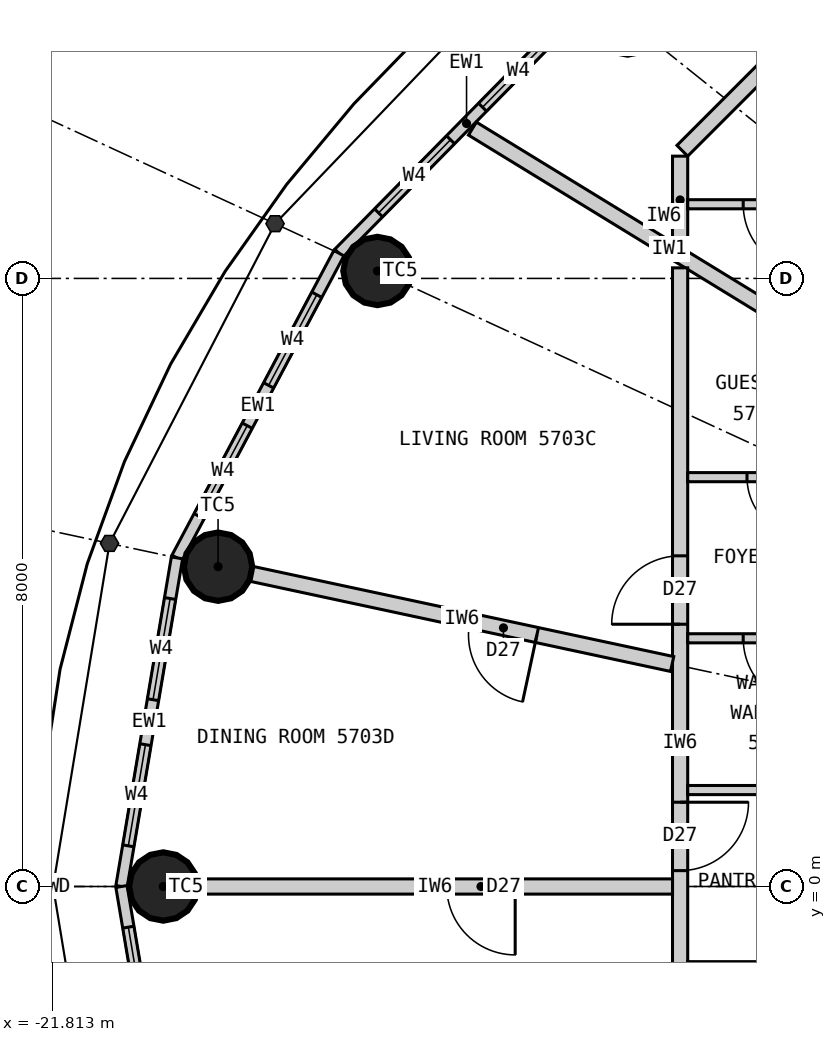
"""IFC4 building model, lengths in metres.
Left out: names, types, materials, properties, quantities, classifications, styles, units other than length and angle.
Written with IfcOpenShell. Run it as: python <this file> out.ifc"""

import sys

from ifc_helpers import new_model, si_unit, direction, frame, frame_2d, origin, origin_2d, place, context, subcontext, project, spatial, rectangle, circle, extrude, element, fill, save


model = new_model("IFC4")
c1 = context("Model", 3, precision=1e-05, world=origin(), true_north=direction((0.0, 1.0)))
c2 = subcontext(c1, "Body", "Model", "MODEL_VIEW")
j1 = project(units=[si_unit("LENGTHUNIT", "METRE"), si_unit("PLANEANGLEUNIT", "RADIAN")], contexts=[c1])
p1 = place(None, origin())
s1 = spatial("IfcSite", under=j1, at=p1, CompositionType="ELEMENT")
p2 = place(p1, origin())
s2 = spatial("IfcBuilding", under=s1, at=p2, CompositionType="ELEMENT")
p3 = place(p2, frame((0.0, 0.0, 212.7)))
s3 = spatial("IfcBuildingStorey", under=s2, at=p3, CompositionType="ELEMENT", Elevation=212.7)
for number, where, z_axis, x_axis in (
    (1, (-14.241, 11.393, 0.0), (0.0, 0.0, 1.0), (1.0, 0.0, 0.0)),
    (2, (-17.532, 8.098, 0.0), (0.0, 0.0, 1.0), (1.0, 0.0, 0.0)),
    (3, (-19.629, 4.208, 0.0), (0.0, 0.0, 1.0), (1.0, 0.0, 0.0)),
    (4, (-20.35, 0.0, 0.0), (0.0, 0.0, 1.0), (1.0, 0.0, 0.0)),
):
    element("IfcColumn", number, at=place(p3, frame(where, z_axis=z_axis, x_axis=x_axis)), inside=s3, PredefinedType="COLUMN", context=c2, shape_type="SweptSolid", body=[
        extrude(circle(Radius=0.45, at=origin_2d()), origin(), (0.0, 0.0, 1.0), 3.3),
    ])
p4 = place(p3, frame((-14.68, 11.744, 0.0), z_axis=(0.0, 0.0, 1.0), x_axis=(-0.701527379618, -0.712642501993, 0.0)))
e5 = element("IfcWall", 5, at=p4, inside=s3, PredefinedType="ELEMENTEDWALL", context=c2, shape_type="SweptSolid", body=[
    extrude(rectangle(XDim=4.788, YDim=0.15, at=frame_2d((2.394, 0.0))), origin(), (0.0, 0.0, 1.0), 3.12),
])
p5 = place(p4, frame((0.744, 0.0, 0.9)))
e6 = element("IfcOpeningElement", 6, at=p5, cuts=e5, PredefinedType="OPENING", context=c2, shape_type="SweptSolid", body=[
    extrude(rectangle(XDim=1.35, YDim=1.9, at=frame_2d((0.675, 0.95))), frame((0.0, 0.085, 0.0), z_axis=(0.0, -1.0, 0.0), x_axis=(1.0, 0.0, 0.0)), (0.0, 0.0, 1.0), 0.17),
])
p6 = place(p4, frame((2.694, 0.0, 0.9)))
e7 = element("IfcOpeningElement", 7, at=p6, cuts=e5, PredefinedType="OPENING", context=c2, shape_type="SweptSolid", body=[
    extrude(rectangle(XDim=1.35, YDim=1.9, at=frame_2d((0.675, 0.95))), frame((0.0, 0.085, 0.0), z_axis=(0.0, -1.0, 0.0), x_axis=(1.0, 0.0, 0.0)), (0.0, 0.0, 1.0), 0.17),
])
p7 = place(p3, frame((-18.04, 8.332, 0.0), z_axis=(0.0, 0.0, 1.0), x_axis=(-0.469256152955, -0.883062094597, 0.0)))
e8 = element("IfcWall", 8, at=p7, inside=s3, PredefinedType="ELEMENTEDWALL", context=c2, shape_type="SweptSolid", body=[
    extrude(rectangle(XDim=4.539, YDim=0.15, at=frame_2d((2.27, 0.0))), origin(), (0.0, 0.0, 1.0), 3.12),
])
p8 = place(p7, frame((0.62, 0.0, 0.9)))
e9 = element("IfcOpeningElement", 9, at=p8, cuts=e8, PredefinedType="OPENING", context=c2, shape_type="SweptSolid", body=[
    extrude(rectangle(XDim=1.35, YDim=1.9, at=frame_2d((0.675, 0.95))), frame((0.0, 0.085, 0.0), z_axis=(0.0, -1.0, 0.0), x_axis=(1.0, 0.0, 0.0)), (0.0, 0.0, 1.0), 0.17),
])
p9 = place(p7, frame((2.57, 0.0, 0.9)))
e10 = element("IfcOpeningElement", 10, at=p9, cuts=e8, PredefinedType="OPENING", context=c2, shape_type="SweptSolid", body=[
    extrude(rectangle(XDim=1.35, YDim=1.9, at=frame_2d((0.675, 0.95))), frame((0.0, 0.085, 0.0), z_axis=(0.0, -1.0, 0.0), x_axis=(1.0, 0.0, 0.0)), (0.0, 0.0, 1.0), 0.17),
])
p10 = place(p3, frame((-20.17, 4.323, 0.0), z_axis=(0.0, 0.0, 1.0), x_axis=(-0.166538513568, -0.986034950445, 0.0)))
e11 = element("IfcWall", 11, at=p10, inside=s3, PredefinedType="ELEMENTEDWALL", context=c2, shape_type="SweptSolid", body=[
    extrude(rectangle(XDim=4.385, YDim=0.15, at=frame_2d((2.192, 0.0))), origin(), (0.0, 0.0, 1.0), 3.12),
])
p11 = place(p10, frame((0.542, 0.0, 0.9)))
e12 = element("IfcOpeningElement", 12, at=p11, cuts=e11, PredefinedType="OPENING", context=c2, shape_type="SweptSolid", body=[
    extrude(rectangle(XDim=1.35, YDim=1.9, at=frame_2d((0.675, 0.95))), frame((0.0, 0.085, 0.0), z_axis=(0.0, -1.0, 0.0), x_axis=(1.0, 0.0, 0.0)), (0.0, 0.0, 1.0), 0.17),
])
p12 = place(p10, frame((2.492, 0.0, 0.9)))
e13 = element("IfcOpeningElement", 13, at=p12, cuts=e11, PredefinedType="OPENING", context=c2, shape_type="SweptSolid", body=[
    extrude(rectangle(XDim=1.35, YDim=1.9, at=frame_2d((0.675, 0.95))), frame((0.0, 0.085, 0.0), z_axis=(0.0, -1.0, 0.0), x_axis=(1.0, 0.0, 0.0)), (0.0, 0.0, 1.0), 0.17),
])
p13 = place(p3, frame((-20.9, 0.0, 0.0), z_axis=(0.0, 0.0, 1.0), x_axis=(0.166538513568, -0.986034950445, 0.0)))
e14 = element("IfcWall", 14, at=p13, inside=s3, PredefinedType="ELEMENTEDWALL", context=c2, shape_type="SweptSolid", body=[
    extrude(rectangle(XDim=4.385, YDim=0.15, at=frame_2d((2.192, 0.0))), origin(), (0.0, 0.0, 1.0), 3.12),
])
p14 = place(p13, frame((0.542, 0.0, 0.9)))
e15 = element("IfcOpeningElement", 15, at=p14, cuts=e14, PredefinedType="OPENING", context=c2, shape_type="SweptSolid", body=[
    extrude(rectangle(XDim=1.35, YDim=1.9, at=frame_2d((0.675, 0.95))), frame((0.0, 0.085, 0.0), z_axis=(0.0, -1.0, 0.0), x_axis=(1.0, 0.0, 0.0)), (0.0, 0.0, 1.0), 0.17),
])
p15 = place(p13, frame((2.492, 0.0, 0.9)))
e16 = element("IfcOpeningElement", 16, at=p15, cuts=e14, PredefinedType="OPENING", context=c2, shape_type="SweptSolid", body=[
    extrude(rectangle(XDim=1.35, YDim=1.9, at=frame_2d((0.675, 0.95))), frame((0.0, 0.085, 0.0), z_axis=(0.0, -1.0, 0.0), x_axis=(1.0, 0.0, 0.0)), (0.0, 0.0, 1.0), 0.17),
])
p16 = place(p3, frame((-11.1, 6.797, 0.0), z_axis=(0.0, 0.0, 1.0), x_axis=(-0.852799818179, 0.522237943963, 0.0)))
e17 = element("IfcWall", 17, at=p16, inside=s3, PredefinedType="PARTITIONING", context=c2, shape_type="SweptSolid", body=[
    extrude(rectangle(XDim=6.077, YDim=0.2, at=frame_2d((3.039, 0.0))), origin(), (0.0, 0.0, 1.0), 3.12),
])
p17 = place(p3, frame((-10.679, 12.521, 0.0), z_axis=(0.0, 0.0, 1.0), x_axis=(-0.707106781187, -0.707106781187, 0.0)))
e18 = element("IfcWall", 18, at=p17, inside=s3, PredefinedType="PARTITIONING", context=c2, shape_type="SweptSolid", body=[
    extrude(rectangle(XDim=4.019, YDim=0.2, at=frame_2d((2.009, 0.0))), origin(), (0.0, 0.0, 1.0), 3.12),
])
p18 = place(p3, frame((-13.55, 9.609, 0.0), z_axis=(0.0, 0.0, 1.0), x_axis=(0.0, -1.0, 0.0)))
e19 = element("IfcWall", 19, at=p18, inside=s3, PredefinedType="PARTITIONING", context=c2, shape_type="SweptSolid", body=[
    extrude(rectangle(XDim=1.153, YDim=0.2, at=frame_2d((0.576, 0.0))), origin(), (0.0, 0.0, 1.0), 3.12),
])
p19 = place(p3, frame((-11.1, 8.976, 0.0), z_axis=(0.0, 0.0, 1.0), x_axis=(-1.0, 0.0, 0.0)))
e20 = element("IfcWall", 20, at=p19, inside=s3, PredefinedType="PARTITIONING", context=c2, shape_type="SweptSolid", body=[
    extrude(rectangle(XDim=2.35, YDim=0.12, at=frame_2d((1.175, 0.0))), origin(), (0.0, 0.0, 1.0), 3.12),
])
p20 = place(p19, frame((0.72, 0.0, 0.0)))
e21 = element("IfcOpeningElement", 21, at=p20, cuts=e20, PredefinedType="OPENING", context=c2, shape_type="SweptSolid", body=[
    extrude(rectangle(XDim=0.9, YDim=2.1, at=frame_2d((0.45, 1.05))), frame((0.0, 0.07, 0.0), z_axis=(0.0, -1.0, 0.0), x_axis=(1.0, 0.0, 0.0)), (0.0, 0.0, 1.0), 0.14),
])
p21 = place(p3, frame((-13.55, 8.139, 0.0), z_axis=(0.0, 0.0, 1.0), x_axis=(0.0, -1.0, 0.0)))
e22 = element("IfcWall", 22, at=p21, inside=s3, PredefinedType="PARTITIONING", context=c2, shape_type="SweptSolid", body=[
    extrude(rectangle(XDim=12.496, YDim=0.2, at=frame_2d((6.248, 0.0))), origin(), (0.0, 0.0, 1.0), 3.12),
])
p22 = place(p21, frame((7.031, 0.0, 0.0)))
e23 = element("IfcOpeningElement", 23, at=p22, cuts=e22, PredefinedType="OPENING", context=c2, shape_type="SweptSolid", body=[
    extrude(rectangle(XDim=0.9, YDim=2.1, at=frame_2d((0.45, 1.05))), frame((0.0, 0.11, 0.0), z_axis=(0.0, -1.0, 0.0), x_axis=(1.0, 0.0, 0.0)), (0.0, 0.0, 1.0), 0.22),
])
p23 = place(p21, frame((9.373, 0.0, 0.0)))
e24 = element("IfcOpeningElement", 24, at=p23, cuts=e22, PredefinedType="OPENING", context=c2, shape_type="SweptSolid", body=[
    extrude(rectangle(XDim=0.8, YDim=2.1, at=frame_2d((0.4, 1.05))), frame((0.0, 0.11, 0.0), z_axis=(0.0, -1.0, 0.0), x_axis=(1.0, 0.0, 0.0)), (0.0, 0.0, 1.0), 0.22),
])
p24 = place(p21, frame((3.789, 0.0, 0.0)))
e25 = element("IfcOpeningElement", 25, at=p24, cuts=e22, PredefinedType="OPENING", context=c2, shape_type="SweptSolid", body=[
    extrude(rectangle(XDim=0.9, YDim=2.1, at=frame_2d((0.45, 1.05))), frame((0.0, 0.11, 0.0), z_axis=(0.0, -1.0, 0.0), x_axis=(1.0, 0.0, 0.0)), (0.0, 0.0, 1.0), 0.22),
])
p25 = place(p3, frame((-13.655, 2.927, 0.0), z_axis=(0.0, 0.0, 1.0), x_axis=(-0.977790419294, 0.209585056568, 0.0)))
e26 = element("IfcWall", 26, at=p25, inside=s3, PredefinedType="PARTITIONING", context=c2, shape_type="SweptSolid", body=[
    extrude(rectangle(XDim=5.66, YDim=0.2, at=frame_2d((2.83, 0.0))), origin(), (0.0, 0.0, 1.0), 2.42),
])
p26 = place(p25, frame((1.82, 0.0, 0.0)))
e27 = element("IfcOpeningElement", 27, at=p26, cuts=e26, PredefinedType="OPENING", context=c2, shape_type="SweptSolid", body=[
    extrude(rectangle(XDim=0.9, YDim=2.1, at=frame_2d((0.45, 1.05))), frame((0.0, 0.11, 0.0), z_axis=(0.0, -1.0, 0.0), x_axis=(1.0, 0.0, 0.0)), (0.0, 0.0, 1.0), 0.22),
])
p27 = place(p3, frame((-13.65, 0.0, 0.0), z_axis=(0.0, 0.0, 1.0), x_axis=(-1.0, 0.0, 0.0)))
e28 = element("IfcWall", 28, at=p27, inside=s3, PredefinedType="PARTITIONING", context=c2, shape_type="SweptSolid", body=[
    extrude(rectangle(XDim=6.25, YDim=0.2, at=frame_2d((3.125, 0.0))), origin(), (0.0, 0.0, 1.0), 2.37),
])
p28 = place(p27, frame((2.07, 0.0, 0.0)))
e29 = element("IfcOpeningElement", 29, at=p28, cuts=e28, PredefinedType="OPENING", context=c2, shape_type="SweptSolid", body=[
    extrude(rectangle(XDim=0.9, YDim=2.1, at=frame_2d((0.45, 1.05))), frame((0.0, 0.11, 0.0), z_axis=(0.0, -1.0, 0.0), x_axis=(1.0, 0.0, 0.0)), (0.0, 0.0, 1.0), 0.22),
])
p29 = place(p3, frame((-11.1, 5.385, 0.0), z_axis=(0.0, 0.0, 1.0), x_axis=(-1.0, 0.0, 0.0)))
e30 = element("IfcWall", 30, at=p29, inside=s3, PredefinedType="PARTITIONING", context=c2, shape_type="SweptSolid", body=[
    extrude(rectangle(XDim=2.35, YDim=0.12, at=frame_2d((1.175, 0.0))), origin(), (0.0, 0.0, 1.0), 3.12),
])
p30 = place(p29, frame((0.77, 0.0, 0.0)))
e31 = element("IfcOpeningElement", 31, at=p30, cuts=e30, PredefinedType="OPENING", context=c2, shape_type="SweptSolid", body=[
    extrude(rectangle(XDim=0.8, YDim=2.1, at=frame_2d((0.4, 1.05))), frame((0.0, 0.07, 0.0), z_axis=(0.0, -1.0, 0.0), x_axis=(1.0, 0.0, 0.0)), (0.0, 0.0, 1.0), 0.14),
])
p31 = place(p3, frame((-11.1, 3.265, 0.0), z_axis=(0.0, 0.0, 1.0), x_axis=(-1.0, 0.0, 0.0)))
e32 = element("IfcWall", 32, at=p31, inside=s3, PredefinedType="PARTITIONING", context=c2, shape_type="SweptSolid", body=[
    extrude(rectangle(XDim=2.35, YDim=0.12, at=frame_2d((1.175, 0.0))), origin(), (0.0, 0.0, 1.0), 2.42),
])
p32 = place(p31, frame((0.72, 0.0, 0.0)))
e33 = element("IfcOpeningElement", 33, at=p32, cuts=e32, PredefinedType="OPENING", context=c2, shape_type="SweptSolid", body=[
    extrude(rectangle(XDim=0.9, YDim=2.1, at=frame_2d((0.45, 1.05))), frame((0.0, 0.07, 0.0), z_axis=(0.0, -1.0, 0.0), x_axis=(1.0, 0.0, 0.0)), (0.0, 0.0, 1.0), 0.14),
])
for number, where, z_axis, x_axis in (
    (34, (-11.1, 1.269, 0.0), (0.0, 0.0, 1.0), (-1.0, 0.0, 0.0)),
    (35, (-11.1, -1.049, 0.0), (0.0, 0.0, 1.0), (-1.0, 0.0, 0.0)),
):
    element("IfcWall", number, at=place(p3, frame(where, z_axis=z_axis, x_axis=x_axis)), inside=s3, PredefinedType="PARTITIONING", context=c2, shape_type="SweptSolid", body=[
        extrude(rectangle(XDim=2.35, YDim=0.12, at=frame_2d((1.175, 0.0))), origin(), (0.0, 0.0, 1.0), 3.12),
    ])
p33 = place(p5, origin())
e36 = element("IfcWindow", 36, at=p33, inside=s3, PartitioningType="SINGLE_PANEL", PredefinedType="WINDOW", context=c2, shape_type="SweptSolid", body=[
    extrude(rectangle(XDim=1.35, YDim=1.9, at=frame_2d((0.675, 0.95))), frame((0.0, 0.03, 0.0), z_axis=(0.0, -1.0, 0.0), x_axis=(1.0, 0.0, 0.0)), (0.0, 0.0, 1.0), 0.06),
])
fill(e6, e36)
p34 = place(p6, origin())
e37 = element("IfcWindow", 37, at=p34, inside=s3, PartitioningType="SINGLE_PANEL", PredefinedType="WINDOW", context=c2, shape_type="SweptSolid", body=[
    extrude(rectangle(XDim=1.35, YDim=1.9, at=frame_2d((0.675, 0.95))), frame((0.0, 0.03, 0.0), z_axis=(0.0, -1.0, 0.0), x_axis=(1.0, 0.0, 0.0)), (0.0, 0.0, 1.0), 0.06),
])
fill(e7, e37)
p35 = place(p8, origin())
e38 = element("IfcWindow", 38, at=p35, inside=s3, PartitioningType="SINGLE_PANEL", PredefinedType="WINDOW", context=c2, shape_type="SweptSolid", body=[
    extrude(rectangle(XDim=1.35, YDim=1.9, at=frame_2d((0.675, 0.95))), frame((0.0, 0.03, 0.0), z_axis=(0.0, -1.0, 0.0), x_axis=(1.0, 0.0, 0.0)), (0.0, 0.0, 1.0), 0.06),
])
fill(e9, e38)
p36 = place(p9, origin())
e39 = element("IfcWindow", 39, at=p36, inside=s3, PartitioningType="SINGLE_PANEL", PredefinedType="WINDOW", context=c2, shape_type="SweptSolid", body=[
    extrude(rectangle(XDim=1.35, YDim=1.9, at=frame_2d((0.675, 0.95))), frame((0.0, 0.03, 0.0), z_axis=(0.0, -1.0, 0.0), x_axis=(1.0, 0.0, 0.0)), (0.0, 0.0, 1.0), 0.06),
])
fill(e10, e39)
p37 = place(p11, origin())
e40 = element("IfcWindow", 40, at=p37, inside=s3, PartitioningType="SINGLE_PANEL", PredefinedType="WINDOW", context=c2, shape_type="SweptSolid", body=[
    extrude(rectangle(XDim=1.35, YDim=1.9, at=frame_2d((0.675, 0.95))), frame((0.0, 0.03, 0.0), z_axis=(0.0, -1.0, 0.0), x_axis=(1.0, 0.0, 0.0)), (0.0, 0.0, 1.0), 0.06),
])
fill(e12, e40)
p38 = place(p12, origin())
e41 = element("IfcWindow", 41, at=p38, inside=s3, PartitioningType="SINGLE_PANEL", PredefinedType="WINDOW", context=c2, shape_type="SweptSolid", body=[
    extrude(rectangle(XDim=1.35, YDim=1.9, at=frame_2d((0.675, 0.95))), frame((0.0, 0.03, 0.0), z_axis=(0.0, -1.0, 0.0), x_axis=(1.0, 0.0, 0.0)), (0.0, 0.0, 1.0), 0.06),
])
fill(e13, e41)
p39 = place(p14, origin())
e42 = element("IfcWindow", 42, at=p39, inside=s3, PartitioningType="SINGLE_PANEL", PredefinedType="WINDOW", context=c2, shape_type="SweptSolid", body=[
    extrude(rectangle(XDim=1.35, YDim=1.9, at=frame_2d((0.675, 0.95))), frame((0.0, 0.03, 0.0), z_axis=(0.0, -1.0, 0.0), x_axis=(1.0, 0.0, 0.0)), (0.0, 0.0, 1.0), 0.06),
])
fill(e15, e42)
p40 = place(p20, origin())
e43 = element("IfcDoor", 43, at=p40, inside=s3, OperationType="SINGLE_SWING_LEFT", PredefinedType="DOOR", context=c2, shape_type="SweptSolid", body=[
    extrude(rectangle(XDim=0.9, YDim=2.1, at=frame_2d((0.45, 1.05))), frame((0.0, 0.025, 0.0), z_axis=(0.0, -1.0, 0.0), x_axis=(1.0, 0.0, 0.0)), (0.0, 0.0, 1.0), 0.05),
])
fill(e21, e43)
p41 = place(p30, origin())
e44 = element("IfcDoor", 44, at=p41, inside=s3, OperationType="SINGLE_SWING_LEFT", PredefinedType="DOOR", context=c2, shape_type="SweptSolid", body=[
    extrude(rectangle(XDim=0.8, YDim=2.1, at=frame_2d((0.4, 1.05))), frame((0.0, 0.025, 0.0), z_axis=(0.0, -1.0, 0.0), x_axis=(1.0, 0.0, 0.0)), (0.0, 0.0, 1.0), 0.05),
])
fill(e31, e44)
p42 = place(p32, origin())
e45 = element("IfcDoor", 45, at=p42, inside=s3, OperationType="SINGLE_SWING_LEFT", PredefinedType="DOOR", context=c2, shape_type="SweptSolid", body=[
    extrude(rectangle(XDim=0.9, YDim=2.1, at=frame_2d((0.45, 1.05))), frame((0.0, 0.025, 0.0), z_axis=(0.0, -1.0, 0.0), x_axis=(1.0, 0.0, 0.0)), (0.0, 0.0, 1.0), 0.05),
])
fill(e33, e45)
p43 = place(p22, origin())
e46 = element("IfcDoor", 46, at=p43, inside=s3, OperationType="SINGLE_SWING_LEFT", PredefinedType="DOOR", context=c2, shape_type="SweptSolid", body=[
    extrude(rectangle(XDim=0.9, YDim=2.1, at=frame_2d((0.45, 1.05))), frame((0.0, 0.025, 0.0), z_axis=(0.0, -1.0, 0.0), x_axis=(1.0, 0.0, 0.0)), (0.0, 0.0, 1.0), 0.05),
])
fill(e23, e46)
p44 = place(p24, origin())
e47 = element("IfcDoor", 47, at=p44, inside=s3, OperationType="SINGLE_SWING_RIGHT", PredefinedType="DOOR", context=c2, shape_type="SweptSolid", body=[
    extrude(rectangle(XDim=0.9, YDim=2.1, at=frame_2d((0.45, 1.05))), frame((0.0, 0.025, 0.0), z_axis=(0.0, -1.0, 0.0), x_axis=(1.0, 0.0, 0.0)), (0.0, 0.0, 1.0), 0.05),
])
fill(e25, e47)
p45 = place(p26, origin())
e48 = element("IfcDoor", 48, at=p45, inside=s3, OperationType="SINGLE_SWING_LEFT", PredefinedType="DOOR", context=c2, shape_type="SweptSolid", body=[
    extrude(rectangle(XDim=0.9, YDim=2.1, at=frame_2d((0.45, 1.05))), frame((0.0, 0.025, 0.0), z_axis=(0.0, -1.0, 0.0), x_axis=(1.0, 0.0, 0.0)), (0.0, 0.0, 1.0), 0.05),
])
fill(e27, e48)
p46 = place(p28, origin())
e49 = element("IfcDoor", 49, at=p46, inside=s3, OperationType="SINGLE_SWING_LEFT", PredefinedType="DOOR", context=c2, shape_type="SweptSolid", body=[
    extrude(rectangle(XDim=0.9, YDim=2.1, at=frame_2d((0.45, 1.05))), frame((0.0, 0.025, 0.0), z_axis=(0.0, -1.0, 0.0), x_axis=(1.0, 0.0, 0.0)), (0.0, 0.0, 1.0), 0.05),
])
fill(e29, e49)
save(model, sys.argv[1])
